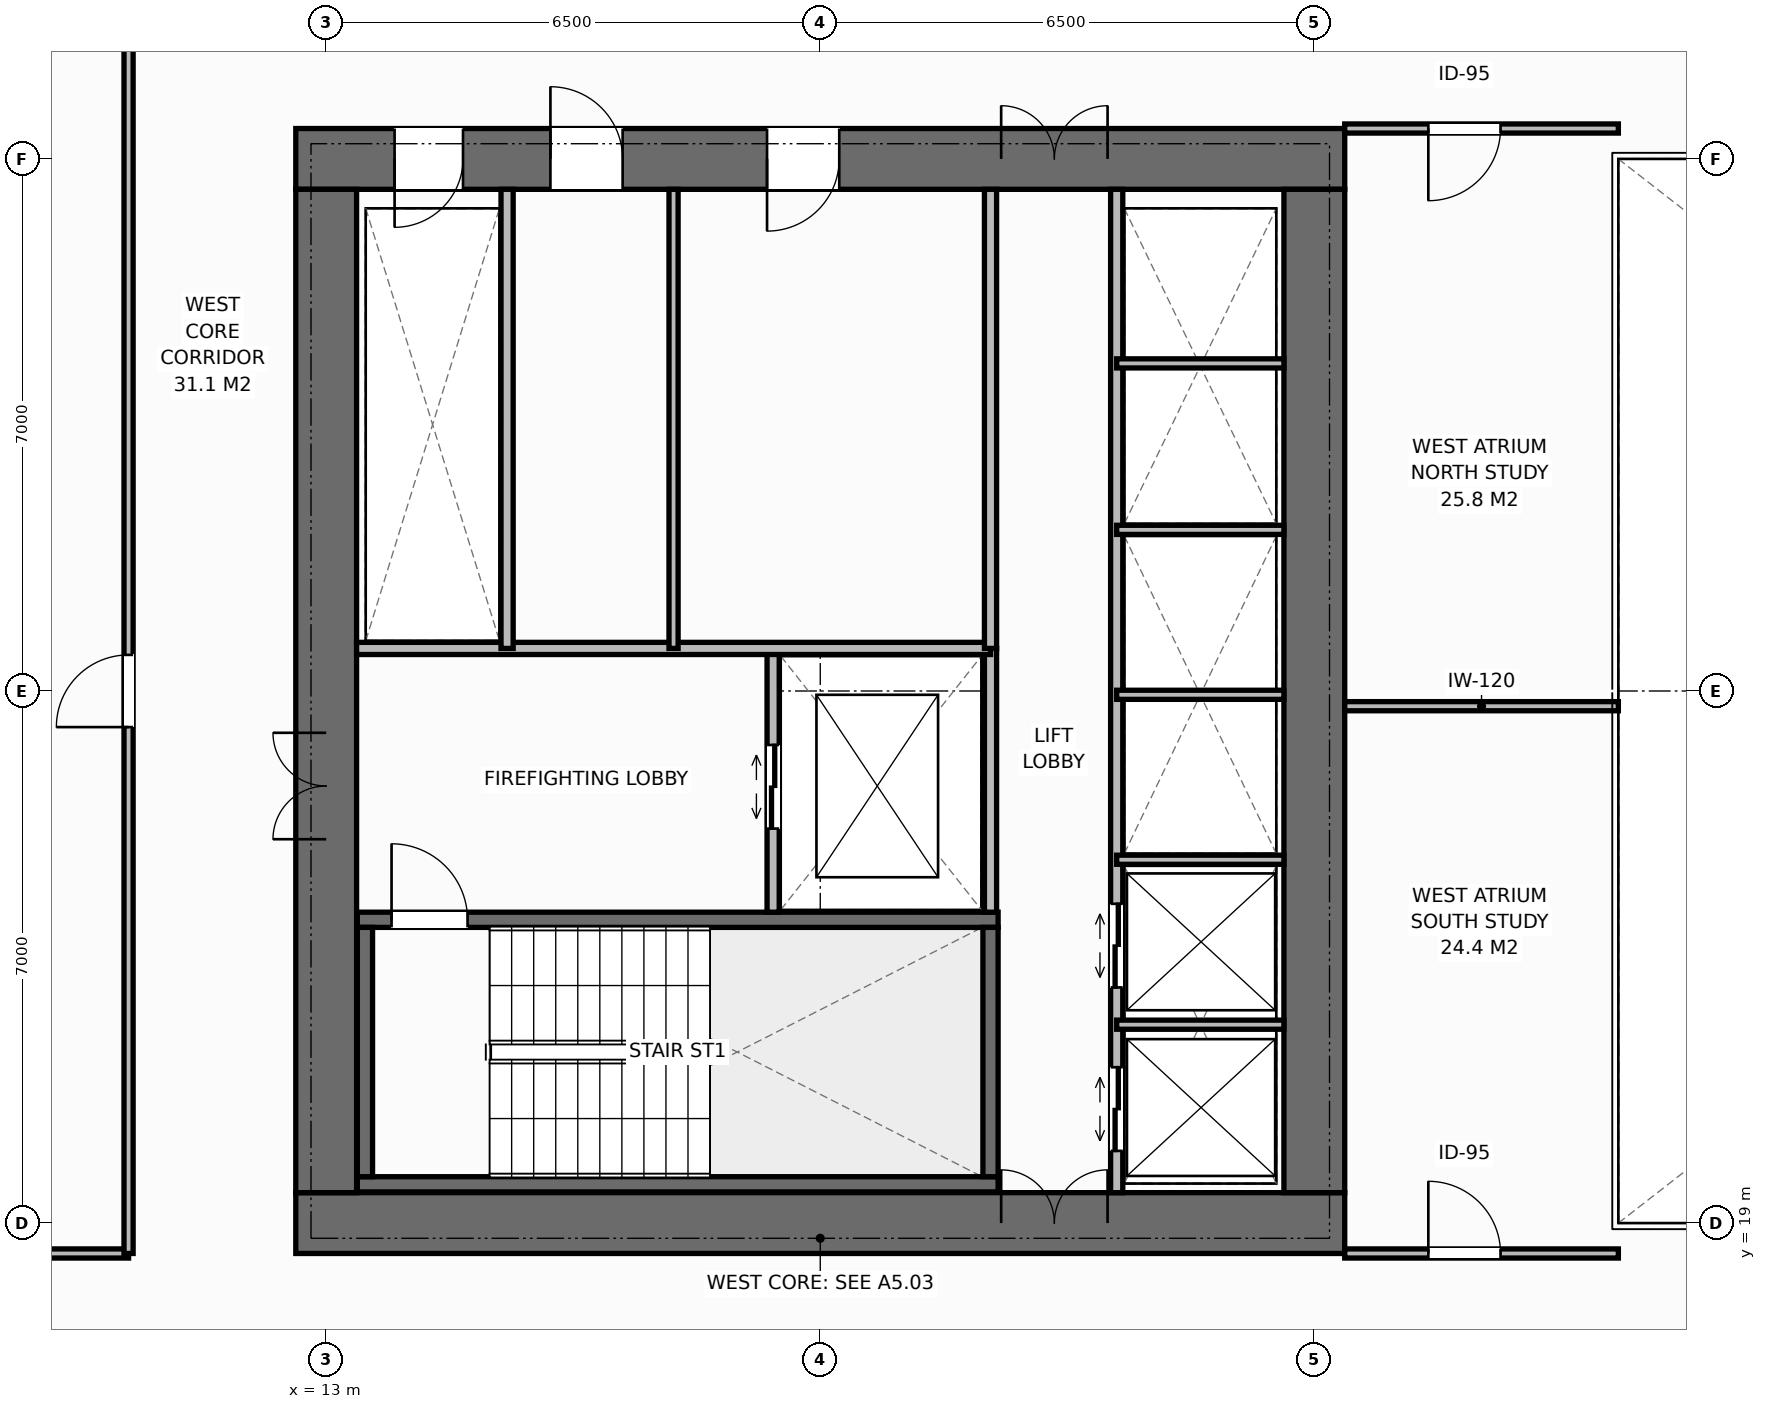
"""IFC4 building model, lengths in metres.
Left out: names, types, materials, properties, quantities, classifications, styles, units other than length and angle.
Written with IfcOpenShell. Run it as: python <this file> out.ifc"""

import sys

from ifc_helpers import new_model, si_unit, direction, frame, frame_2d, origin, place, context, subcontext, project, spatial, rectangle, extrude, element, fill, save


model = new_model("IFC4")
c1 = context("Model", 3, precision=1e-05, world=origin(), true_north=direction((0.0, 1.0)))
c2 = subcontext(c1, "Body", "Model", "MODEL_VIEW")
j1 = project(units=[si_unit("LENGTHUNIT", "METRE"), si_unit("PLANEANGLEUNIT", "RADIAN")], contexts=[c1])
p1 = place(None, origin())
s1 = spatial("IfcSite", under=j1, at=p1, CompositionType="ELEMENT")
p2 = place(p1, origin())
s2 = spatial("IfcBuilding", under=s1, at=p2, CompositionType="ELEMENT")
p3 = place(p2, frame((0.0, 0.0, 69.6)))
s3 = spatial("IfcBuildingStorey", under=s2, at=p3, CompositionType="ELEMENT", Elevation=69.6)
p4 = place(p3, frame((12.6, 19.0, 0.0), z_axis=(0.0, 0.0, 1.0), x_axis=(1.0, 0.0, 0.0)))
e1 = element("IfcWall", 1, at=p4, inside=s3, PredefinedType="SHEAR", context=c2, shape_type="SweptSolid", body=[
    extrude(rectangle(XDim=13.8, YDim=0.8, at=frame_2d((6.9, 0.0))), origin(), (0.0, 0.0, 1.0), 3.8),
])
p5 = place(p4, frame((9.28, 0.0, 0.0)))
e2 = element("IfcOpeningElement", 2, at=p5, cuts=e1, PredefinedType="OPENING", context=c2, shape_type="SweptSolid", body=[
    extrude(rectangle(XDim=1.4, YDim=2.2, at=frame_2d((0.7, 1.1))), frame((0.0, 0.41, 0.0), z_axis=(0.0, -1.0, 0.0), x_axis=(1.0, 0.0, 0.0)), (0.0, 0.0, 1.0), 0.82),
])
p6 = place(p3, frame((12.6, 33.0, 0.0), z_axis=(0.0, 0.0, 1.0), x_axis=(1.0, 0.0, 0.0)))
e3 = element("IfcWall", 3, at=p6, inside=s3, PredefinedType="SHEAR", context=c2, shape_type="SweptSolid", body=[
    extrude(rectangle(XDim=13.8, YDim=0.8, at=frame_2d((6.9, 0.0))), origin(), (0.0, 0.0, 1.0), 3.8),
])
p7 = place(p6, frame((1.3, 0.0, 0.0)))
e4 = element("IfcOpeningElement", 4, at=p7, cuts=e3, PredefinedType="OPENING", context=c2, shape_type="SweptSolid", body=[
    extrude(rectangle(XDim=0.9, YDim=2.15, at=frame_2d((0.45, 1.075))), frame((0.0, 0.41, 0.0), z_axis=(0.0, -1.0, 0.0), x_axis=(1.0, 0.0, 0.0)), (0.0, 0.0, 1.0), 0.82),
])
p8 = place(p6, frame((3.35, 0.0, 0.0)))
e5 = element("IfcOpeningElement", 5, at=p8, cuts=e3, PredefinedType="OPENING", context=c2, shape_type="SweptSolid", body=[
    extrude(rectangle(XDim=0.95, YDim=2.15, at=frame_2d((0.475, 1.075))), frame((0.0, 0.41, 0.0), z_axis=(0.0, -1.0, 0.0), x_axis=(1.0, 0.0, 0.0)), (0.0, 0.0, 1.0), 0.82),
])
p9 = place(p6, frame((6.2, 0.0, 0.0)))
e6 = element("IfcOpeningElement", 6, at=p9, cuts=e3, PredefinedType="OPENING", context=c2, shape_type="SweptSolid", body=[
    extrude(rectangle(XDim=0.95, YDim=2.15, at=frame_2d((0.475, 1.075))), frame((0.0, 0.41, 0.0), z_axis=(0.0, -1.0, 0.0), x_axis=(1.0, 0.0, 0.0)), (0.0, 0.0, 1.0), 0.82),
])
p10 = place(p6, frame((9.28, 0.0, 0.0)))
e7 = element("IfcOpeningElement", 7, at=p10, cuts=e3, PredefinedType="OPENING", context=c2, shape_type="SweptSolid", body=[
    extrude(rectangle(XDim=1.4, YDim=2.2, at=frame_2d((0.7, 1.1))), frame((0.0, 0.41, 0.0), z_axis=(0.0, -1.0, 0.0), x_axis=(1.0, 0.0, 0.0)), (0.0, 0.0, 1.0), 0.82),
])
p11 = place(p3, frame((13.0, 19.4, 0.0), z_axis=(0.0, 0.0, 1.0), x_axis=(0.0, 1.0, 0.0)))
e8 = element("IfcWall", 8, at=p11, inside=s3, PredefinedType="SHEAR", context=c2, shape_type="SweptSolid", body=[
    extrude(rectangle(XDim=13.2, YDim=0.8, at=frame_2d((6.6, 0.0))), origin(), (0.0, 0.0, 1.0), 3.8),
])
p12 = place(p11, frame((4.65, 0.0, 0.0)))
e9 = element("IfcOpeningElement", 9, at=p12, cuts=e8, PredefinedType="OPENING", context=c2, shape_type="SweptSolid", body=[
    extrude(rectangle(XDim=1.4, YDim=2.2, at=frame_2d((0.7, 1.1))), frame((0.0, 0.41, 0.0), z_axis=(0.0, -1.0, 0.0), x_axis=(1.0, 0.0, 0.0)), (0.0, 0.0, 1.0), 0.82),
])
p13 = place(p3, frame((26.0, 19.4, 0.0), z_axis=(0.0, 0.0, 1.0), x_axis=(0.0, 1.0, 0.0)))
e10 = element("IfcWall", 10, at=p13, inside=s3, PredefinedType="SHEAR", context=c2, shape_type="SweptSolid", body=[
    extrude(rectangle(XDim=13.2, YDim=0.8, at=frame_2d((6.6, 0.0))), origin(), (0.0, 0.0, 1.0), 3.8),
])
p14 = place(p3, frame((13.41, 19.51, 0.0), z_axis=(0.0, 0.0, 1.0), x_axis=(1.0, 0.0, 0.0)))
e11 = element("IfcWall", 11, at=p14, inside=s3, PredefinedType="SHEAR", context=c2, shape_type="SweptSolid", body=[
    extrude(rectangle(XDim=8.43, YDim=0.2, at=frame_2d((4.215, 0.0))), origin(), (0.0, 0.0, 1.0), 3.8),
])
p15 = place(p3, frame((13.41, 22.99, 0.0), z_axis=(0.0, 0.0, 1.0), x_axis=(1.0, 0.0, 0.0)))
e12 = element("IfcWall", 12, at=p15, inside=s3, PredefinedType="SHEAR", context=c2, shape_type="SweptSolid", body=[
    extrude(rectangle(XDim=8.43, YDim=0.2, at=frame_2d((4.215, 0.0))), origin(), (0.0, 0.0, 1.0), 3.8),
])
p16 = place(p15, frame((0.45, 0.0, 0.0)))
e13 = element("IfcOpeningElement", 13, at=p16, cuts=e12, PredefinedType="OPENING", context=c2, shape_type="SweptSolid", body=[
    extrude(rectangle(XDim=1.0, YDim=2.15, at=frame_2d((0.5, 1.075))), frame((0.0, 0.11, 0.0), z_axis=(0.0, -1.0, 0.0), x_axis=(1.0, 0.0, 0.0)), (0.0, 0.0, 1.0), 0.22),
])
for number, where, z_axis, x_axis in (
    (14, (13.51, 19.61, 0.0), (0.0, 0.0, 1.0), (0.0, 1.0, 0.0)),
    (15, (21.74, 19.61, 0.0), (0.0, 0.0, 1.0), (0.0, 1.0, 0.0)),
):
    element("IfcWall", number, at=place(p3, frame(where, z_axis=z_axis, x_axis=x_axis)), inside=s3, PredefinedType="SHEAR", context=c2, shape_type="SweptSolid", body=[
        extrude(rectangle(XDim=3.28, YDim=0.2, at=frame_2d((1.64, 0.0))), origin(), (0.0, 0.0, 1.0), 3.8),
    ])
p17 = place(p3, frame((21.74, 23.09, 0.0), z_axis=(0.0, 0.0, 1.0), x_axis=(0.0, 1.0, 0.0)))
e16 = element("IfcWall", 16, at=p17, inside=s3, PredefinedType="STANDARD", context=c2, shape_type="SweptSolid", body=[
    extrude(rectangle(XDim=3.47, YDim=0.16, at=frame_2d((1.735, 0.0))), origin(), (0.0, 0.0, 1.0), 3.55),
])
p18 = place(p3, frame((18.88, 23.09, 0.0), z_axis=(0.0, 0.0, 1.0), x_axis=(0.0, 1.0, 0.0)))
e17 = element("IfcWall", 17, at=p18, inside=s3, PredefinedType="STANDARD", context=c2, shape_type="SweptSolid", body=[
    extrude(rectangle(XDim=3.47, YDim=0.16, at=frame_2d((1.735, 0.0))), origin(), (0.0, 0.0, 1.0), 3.55),
])
p19 = place(p18, frame((1.1, 0.0, 0.0)))
e18 = element("IfcOpeningElement", 18, at=p19, cuts=e17, PredefinedType="OPENING", context=c2, shape_type="SweptSolid", body=[
    extrude(rectangle(XDim=1.1, YDim=2.2, at=frame_2d((0.55, 1.1))), frame((0.0, 0.09, 0.0), z_axis=(0.0, -1.0, 0.0), x_axis=(1.0, 0.0, 0.0)), (0.0, 0.0, 1.0), 0.18),
])
p20 = place(p3, frame((13.4, 26.56, 0.0), z_axis=(0.0, 0.0, 1.0), x_axis=(1.0, 0.0, 0.0)))
e19 = element("IfcWall", 19, at=p20, inside=s3, PredefinedType="STANDARD", context=c2, shape_type="SweptSolid", body=[
    extrude(rectangle(XDim=8.34, YDim=0.16, at=frame_2d((4.17, 0.0))), origin(), (0.0, 0.0, 1.0), 3.55),
])
p21 = place(p3, frame((15.38, 26.56, 0.0), z_axis=(0.0, 0.0, 1.0), x_axis=(0.0, 1.0, 0.0)))
e20 = element("IfcWall", 20, at=p21, inside=s3, PredefinedType="STANDARD", context=c2, shape_type="SweptSolid", body=[
    extrude(rectangle(XDim=6.04, YDim=0.16, at=frame_2d((3.02, 0.0))), origin(), (0.0, 0.0, 1.0), 3.55),
])
p22 = place(p3, frame((17.57, 26.56, 0.0), z_axis=(0.0, 0.0, 1.0), x_axis=(0.0, 1.0, 0.0)))
e21 = element("IfcWall", 21, at=p22, inside=s3, PredefinedType="PARTITIONING", context=c2, shape_type="SweptSolid", body=[
    extrude(rectangle(XDim=6.04, YDim=0.12, at=frame_2d((3.02, 0.0))), origin(), (0.0, 0.0, 1.0), 3.55),
])
p23 = place(p3, frame((21.74, 26.56, 0.0), z_axis=(0.0, 0.0, 1.0), x_axis=(0.0, 1.0, 0.0)))
e22 = element("IfcWall", 22, at=p23, inside=s3, PredefinedType="STANDARD", context=c2, shape_type="SweptSolid", body=[
    extrude(rectangle(XDim=6.04, YDim=0.16, at=frame_2d((3.02, 0.0))), origin(), (0.0, 0.0, 1.0), 3.55),
])
p24 = place(p3, frame((23.4, 19.4, 0.0), z_axis=(0.0, 0.0, 1.0), x_axis=(0.0, 1.0, 0.0)))
e23 = element("IfcWall", 23, at=p24, inside=s3, PredefinedType="STANDARD", context=c2, shape_type="SweptSolid", body=[
    extrude(rectangle(XDim=13.2, YDim=0.16, at=frame_2d((6.6, 0.0))), origin(), (0.0, 0.0, 1.0), 3.55),
])
p25 = place(p24, frame((0.55, 0.0, 0.0)))
e24 = element("IfcOpeningElement", 24, at=p25, cuts=e23, PredefinedType="OPENING", context=c2, shape_type="SweptSolid", body=[
    extrude(rectangle(XDim=1.1, YDim=2.2, at=frame_2d((0.55, 1.1))), frame((0.0, 0.09, 0.0), z_axis=(0.0, -1.0, 0.0), x_axis=(1.0, 0.0, 0.0)), (0.0, 0.0, 1.0), 0.18),
])
p26 = place(p24, frame((2.7, 0.0, 0.0)))
e25 = element("IfcOpeningElement", 25, at=p26, cuts=e23, PredefinedType="OPENING", context=c2, shape_type="SweptSolid", body=[
    extrude(rectangle(XDim=1.1, YDim=2.2, at=frame_2d((0.55, 1.1))), frame((0.0, 0.09, 0.0), z_axis=(0.0, -1.0, 0.0), x_axis=(1.0, 0.0, 0.0)), (0.0, 0.0, 1.0), 0.18),
])
for number, where, z_axis, x_axis in (
    (26, (23.4, 21.61, 0.0), (0.0, 0.0, 1.0), (1.0, 0.0, 0.0)),
    (27, (23.4, 23.78, 0.0), (0.0, 0.0, 1.0), (1.0, 0.0, 0.0)),
    (28, (23.4, 25.95, 0.0), (0.0, 0.0, 1.0), (1.0, 0.0, 0.0)),
    (29, (23.4, 28.12, 0.0), (0.0, 0.0, 1.0), (1.0, 0.0, 0.0)),
    (30, (23.4, 30.31, 0.0), (0.0, 0.0, 1.0), (1.0, 0.0, 0.0)),
):
    element("IfcWall", number, at=place(p3, frame(where, z_axis=z_axis, x_axis=x_axis)), inside=s3, PredefinedType="PARTITIONING", context=c2, shape_type="SweptSolid", body=[
        extrude(rectangle(XDim=2.2, YDim=0.12, at=frame_2d((1.1, 0.0))), origin(), (0.0, 0.0, 1.0), 3.55),
    ])
p27 = place(p3, frame((26.4, 25.8, 0.0), z_axis=(0.0, 0.0, 1.0), x_axis=(1.0, 0.0, 0.0)))
e31 = element("IfcWall", 31, at=p27, inside=s3, PredefinedType="PARTITIONING", context=c2, shape_type="SweptSolid", body=[
    extrude(rectangle(XDim=3.6, YDim=0.12, at=frame_2d((1.8, 0.0))), origin(), (0.0, 0.0, 1.0), 3.55),
])
p28 = place(p3, frame((26.4, 18.6, 0.0), z_axis=(0.0, 0.0, 1.0), x_axis=(1.0, 0.0, 0.0)))
e32 = element("IfcWall", 32, at=p28, inside=s3, PredefinedType="PARTITIONING", context=c2, shape_type="SweptSolid", body=[
    extrude(rectangle(XDim=3.6, YDim=0.12, at=frame_2d((1.8, 0.0))), origin(), (0.0, 0.0, 1.0), 3.55),
])
p29 = place(p28, frame((1.1, 0.0, 0.0)))
e33 = element("IfcOpeningElement", 33, at=p29, cuts=e32, PredefinedType="OPENING", context=c2, shape_type="SweptSolid", body=[
    extrude(rectangle(XDim=0.95, YDim=2.15, at=frame_2d((0.475, 1.075))), frame((0.0, 0.07, 0.0), z_axis=(0.0, -1.0, 0.0), x_axis=(1.0, 0.0, 0.0)), (0.0, 0.0, 1.0), 0.14),
])
p30 = place(p3, frame((26.4, 33.4, 0.0), z_axis=(0.0, 0.0, 1.0), x_axis=(1.0, 0.0, 0.0)))
e34 = element("IfcWall", 34, at=p30, inside=s3, PredefinedType="PARTITIONING", context=c2, shape_type="SweptSolid", body=[
    extrude(rectangle(XDim=3.6, YDim=0.12, at=frame_2d((1.8, 0.0))), origin(), (0.0, 0.0, 1.0), 3.55),
])
p31 = place(p30, frame((1.1, 0.0, 0.0)))
e35 = element("IfcOpeningElement", 35, at=p31, cuts=e34, PredefinedType="OPENING", context=c2, shape_type="SweptSolid", body=[
    extrude(rectangle(XDim=0.95, YDim=2.15, at=frame_2d((0.475, 1.075))), frame((0.0, 0.07, 0.0), z_axis=(0.0, -1.0, 0.0), x_axis=(1.0, 0.0, 0.0)), (0.0, 0.0, 1.0), 0.14),
])
p32 = place(p3, frame((-0.18, 18.6, 0.0), z_axis=(0.0, 0.0, 1.0), x_axis=(1.0, 0.0, 0.0)))
e36 = element("IfcWall", 36, at=p32, inside=s3, PredefinedType="PARTITIONING", context=c2, shape_type="SweptSolid", body=[
    extrude(rectangle(XDim=10.58, YDim=0.12, at=frame_2d((5.29, 0.0))), origin(), (0.0, 0.0, 1.0), 3.55),
])
p33 = place(p3, frame((10.4, 18.6, 0.0), z_axis=(0.0, 0.0, 1.0), x_axis=(0.0, 1.0, 0.0)))
e37 = element("IfcWall", 37, at=p33, inside=s3, PredefinedType="PARTITIONING", context=c2, shape_type="SweptSolid", body=[
    extrude(rectangle(XDim=16.9, YDim=0.12, at=frame_2d((8.45, 0.0))), origin(), (0.0, 0.0, 1.0), 3.55),
])
p34 = place(p33, frame((6.925, 0.0, 0.0)))
e38 = element("IfcOpeningElement", 38, at=p34, cuts=e37, PredefinedType="OPENING", context=c2, shape_type="SweptSolid", body=[
    extrude(rectangle(XDim=0.95, YDim=2.15, at=frame_2d((0.475, 1.075))), frame((0.0, 0.07, 0.0), z_axis=(0.0, -1.0, 0.0), x_axis=(1.0, 0.0, 0.0)), (0.0, 0.0, 1.0), 0.14),
])
p35 = place(p16, origin())
e39 = element("IfcDoor", 39, at=p35, inside=s3, OperationType="SINGLE_SWING_LEFT", PredefinedType="DOOR", context=c2, shape_type="SweptSolid", body=[
    extrude(rectangle(XDim=1.0, YDim=2.15, at=frame_2d((0.5, 1.075))), frame((0.0, 0.025, 0.0), z_axis=(0.0, -1.0, 0.0), x_axis=(1.0, 0.0, 0.0)), (0.0, 0.0, 1.0), 0.05),
])
fill(e13, e39)
p36 = place(p12, origin())
e40 = element("IfcDoor", 40, at=p36, inside=s3, OperationType="DOUBLE_DOOR_SINGLE_SWING", PredefinedType="DOOR", context=c2, shape_type="SweptSolid", body=[
    extrude(rectangle(XDim=1.4, YDim=2.2, at=frame_2d((0.7, 1.1))), frame((0.0, 0.025, 0.0), z_axis=(0.0, -1.0, 0.0), x_axis=(1.0, 0.0, 0.0)), (0.0, 0.0, 1.0), 0.05),
])
fill(e9, e40)
p37 = place(p19, origin())
e41 = element("IfcDoor", 41, at=p37, inside=s3, OperationType="DOUBLE_DOOR_SLIDING", PredefinedType="DOOR", context=c2, shape_type="SweptSolid", body=[
    extrude(rectangle(XDim=1.1, YDim=2.2, at=frame_2d((0.55, 1.1))), frame((0.0, 0.025, 0.0), z_axis=(0.0, -1.0, 0.0), x_axis=(1.0, 0.0, 0.0)), (0.0, 0.0, 1.0), 0.05),
])
fill(e18, e41)
p38 = place(p7, origin())
e42 = element("IfcDoor", 42, at=p38, inside=s3, OperationType="SINGLE_SWING_RIGHT", PredefinedType="DOOR", context=c2, shape_type="SweptSolid", body=[
    extrude(rectangle(XDim=0.9, YDim=2.15, at=frame_2d((0.45, 1.075))), frame((0.0, -0.075, 0.0), z_axis=(0.0, -1.0, 0.0), x_axis=(1.0, 0.0, 0.0)), (0.0, 0.0, 1.0), 0.05),
])
fill(e4, e42)
p39 = place(p8, origin())
e43 = element("IfcDoor", 43, at=p39, inside=s3, OperationType="SINGLE_SWING_LEFT", PredefinedType="DOOR", context=c2, shape_type="SweptSolid", body=[
    extrude(rectangle(XDim=0.95, YDim=2.15, at=frame_2d((0.475, 1.075))), frame((0.0, -0.075, 0.0), z_axis=(0.0, -1.0, 0.0), x_axis=(1.0, 0.0, 0.0)), (0.0, 0.0, 1.0), 0.05),
])
fill(e5, e43)
p40 = place(p9, origin())
e44 = element("IfcDoor", 44, at=p40, inside=s3, OperationType="SINGLE_SWING_RIGHT", PredefinedType="DOOR", context=c2, shape_type="SweptSolid", body=[
    extrude(rectangle(XDim=0.95, YDim=2.15, at=frame_2d((0.475, 1.075))), frame((0.0, -0.075, 0.0), z_axis=(0.0, -1.0, 0.0), x_axis=(1.0, 0.0, 0.0)), (0.0, 0.0, 1.0), 0.05),
])
fill(e6, e44)
p41 = place(p5, origin())
e45 = element("IfcDoor", 45, at=p41, inside=s3, OperationType="DOUBLE_DOOR_SINGLE_SWING", PredefinedType="DOOR", context=c2, shape_type="SweptSolid", body=[
    extrude(rectangle(XDim=1.4, YDim=2.2, at=frame_2d((0.7, 1.1))), frame((0.0, 0.125, 0.0), z_axis=(0.0, -1.0, 0.0), x_axis=(1.0, 0.0, 0.0)), (0.0, 0.0, 1.0), 0.05),
])
fill(e2, e45)
p42 = place(p10, origin())
e46 = element("IfcDoor", 46, at=p42, inside=s3, OperationType="DOUBLE_DOOR_SINGLE_SWING", PredefinedType="DOOR", context=c2, shape_type="SweptSolid", body=[
    extrude(rectangle(XDim=1.4, YDim=2.2, at=frame_2d((0.7, 1.1))), frame((0.0, -0.075, 0.0), z_axis=(0.0, -1.0, 0.0), x_axis=(1.0, 0.0, 0.0)), (0.0, 0.0, 1.0), 0.05),
])
fill(e7, e46)
p43 = place(p25, origin())
e47 = element("IfcDoor", 47, at=p43, inside=s3, OperationType="DOUBLE_DOOR_SLIDING", PredefinedType="DOOR", context=c2, shape_type="SweptSolid", body=[
    extrude(rectangle(XDim=1.1, YDim=2.2, at=frame_2d((0.55, 1.1))), frame((0.0, 0.025, 0.0), z_axis=(0.0, -1.0, 0.0), x_axis=(1.0, 0.0, 0.0)), (0.0, 0.0, 1.0), 0.05),
])
fill(e24, e47)
p44 = place(p26, origin())
e48 = element("IfcDoor", 48, at=p44, inside=s3, OperationType="DOUBLE_DOOR_SLIDING", PredefinedType="DOOR", context=c2, shape_type="SweptSolid", body=[
    extrude(rectangle(XDim=1.1, YDim=2.2, at=frame_2d((0.55, 1.1))), frame((0.0, 0.025, 0.0), z_axis=(0.0, -1.0, 0.0), x_axis=(1.0, 0.0, 0.0)), (0.0, 0.0, 1.0), 0.05),
])
fill(e25, e48)
p45 = place(p29, origin())
e49 = element("IfcDoor", 49, at=p45, inside=s3, OperationType="SINGLE_SWING_LEFT", PredefinedType="DOOR", context=c2, shape_type="SweptSolid", body=[
    extrude(rectangle(XDim=0.95, YDim=2.15, at=frame_2d((0.475, 1.075))), frame((0.0, 0.025, 0.0), z_axis=(0.0, -1.0, 0.0), x_axis=(1.0, 0.0, 0.0)), (0.0, 0.0, 1.0), 0.05),
])
fill(e33, e49)
p46 = place(p31, origin())
e50 = element("IfcDoor", 50, at=p46, inside=s3, OperationType="SINGLE_SWING_RIGHT", PredefinedType="DOOR", context=c2, shape_type="SweptSolid", body=[
    extrude(rectangle(XDim=0.95, YDim=2.15, at=frame_2d((0.475, 1.075))), frame((0.0, 0.025, 0.0), z_axis=(0.0, -1.0, 0.0), x_axis=(1.0, 0.0, 0.0)), (0.0, 0.0, 1.0), 0.05),
])
fill(e35, e50)
p47 = place(p34, origin())
e51 = element("IfcDoor", 51, at=p47, inside=s3, OperationType="SINGLE_SWING_LEFT", PredefinedType="DOOR", context=c2, shape_type="SweptSolid", body=[
    extrude(rectangle(XDim=0.95, YDim=2.15, at=frame_2d((0.475, 1.075))), frame((0.0, 0.025, 0.0), z_axis=(0.0, -1.0, 0.0), x_axis=(1.0, 0.0, 0.0)), (0.0, 0.0, 1.0), 0.05),
])
fill(e38, e51)
save(model, sys.argv[1])
